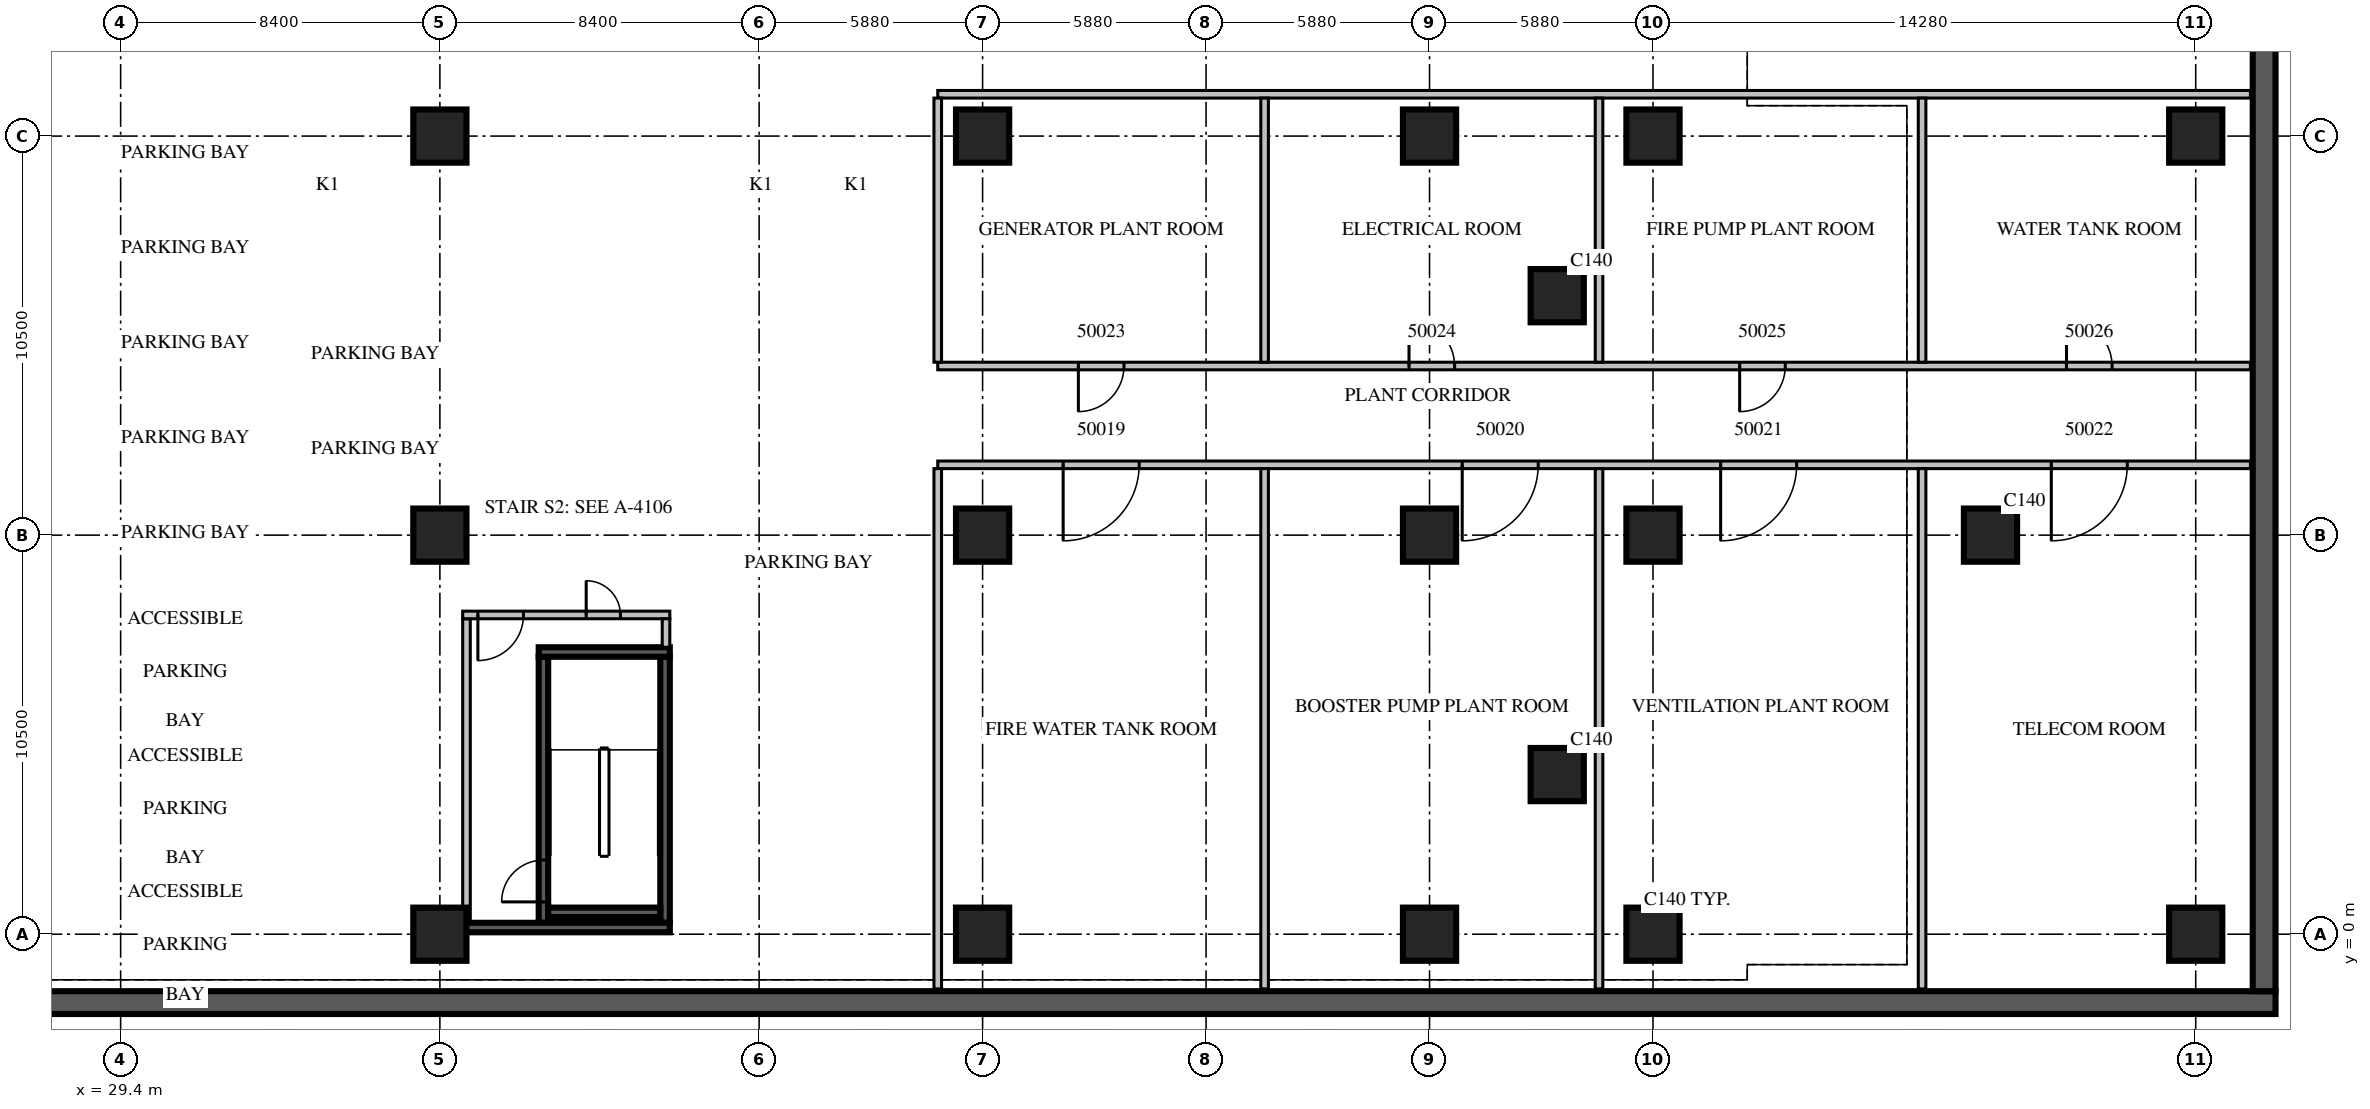
"""IFC4 building model, lengths in metres.
Left out: names, types, materials, properties, quantities, classifications, styles, units other than length and angle.
Written with IfcOpenShell. Run it as: python <this file> out.ifc"""

import sys

from ifc_helpers import new_model, si_unit, direction, frame, frame_2d, origin, origin_2d, place, context, subcontext, project, spatial, rectangle, extrude, source, transform, mapped, element, fill, save


model = new_model("IFC4")
c1 = context("Model", 3, precision=1e-05, world=origin(), true_north=direction((0.0, 1.0)))
c2 = subcontext(c1, "Body", "Model", "MODEL_VIEW")
j1 = project(units=[si_unit("LENGTHUNIT", "METRE"), si_unit("PLANEANGLEUNIT", "RADIAN")], contexts=[c1])
p1 = place(None, origin())
s1 = spatial("IfcSite", under=j1, at=p1, CompositionType="ELEMENT")
p2 = place(p1, origin())
s2 = spatial("IfcBuilding", under=s1, at=p2, CompositionType="ELEMENT")
p3 = place(p2, frame((0.0, 0.0, -13.5)))
s3 = spatial("IfcBuildingStorey", under=s2, at=p3, CompositionType="ELEMENT", Elevation=-13.5)
m1 = source(origin(), c2, "Body", "SweptSolid", [
    extrude(rectangle(XDim=87.6, YDim=0.6, at=frame_2d((43.8, 0.0))), origin(), (0.0, 0.0, 1.0), 4.5),
])
p4 = place(p3, frame((-1.5, -1.8, 0.0), z_axis=(0.0, 0.0, 1.0), x_axis=(1.0, 0.0, 0.0)))
e1 = element("IfcWall", 1, at=p4, inside=s3, PredefinedType="SOLIDWALL", context=c2, shape_type="MappedRepresentation", body=[
    mapped(m1, transform((0.0, 0.0, 0.0), scale=1.0)),
])
m2 = source(origin(), c2, "Body", "SweptSolid", [
    extrude(rectangle(XDim=55.68, YDim=0.6, at=frame_2d((27.84, 0.0))), origin(), (0.0, 0.0, 1.0), 4.5),
])
p5 = place(p3, frame((85.8, -1.5, 0.0), z_axis=(0.0, 0.0, 1.0), x_axis=(0.0, 1.0, 0.0)))
e2 = element("IfcWall", 2, at=p5, inside=s3, PredefinedType="SOLIDWALL", context=c2, shape_type="MappedRepresentation", body=[
    mapped(m2, transform((0.0, 0.0, 0.0), scale=1.0)),
])
m3 = source(origin(), c2, "Body", "SweptSolid", [
    extrude(rectangle(XDim=1.4, YDim=1.4, at=origin_2d()), origin(), (0.0, 0.0, 1.0), 4.5),
])
for number, where, z_axis, x_axis in (
    (3, (37.8, 0.0, 0.0), (0.0, 0.0, 1.0), (1.0, 0.0, 0.0)),
    (4, (37.8, 10.5, 0.0), (0.0, 0.0, 1.0), (1.0, 0.0, 0.0)),
    (5, (37.8, 21.0, 0.0), (0.0, 0.0, 1.0), (1.0, 0.0, 0.0)),
    (6, (52.08, 0.0, 0.0), (0.0, 0.0, 1.0), (1.0, 0.0, 0.0)),
    (7, (52.08, 10.5, 0.0), (0.0, 0.0, 1.0), (1.0, 0.0, 0.0)),
    (8, (52.08, 21.0, 0.0), (0.0, 0.0, 1.0), (1.0, 0.0, 0.0)),
    (9, (63.84, 0.0, 0.0), (0.0, 0.0, 1.0), (1.0, 0.0, 0.0)),
    (10, (63.84, 10.5, 0.0), (0.0, 0.0, 1.0), (1.0, 0.0, 0.0)),
    (11, (63.84, 21.0, 0.0), (0.0, 0.0, 1.0), (1.0, 0.0, 0.0)),
    (12, (67.2, 4.2, 0.0), (0.0, 0.0, 1.0), (1.0, 0.0, 0.0)),
    (13, (67.2, 16.8, 0.0), (0.0, 0.0, 1.0), (1.0, 0.0, 0.0)),
    (14, (69.72, 0.0, 0.0), (0.0, 0.0, 1.0), (1.0, 0.0, 0.0)),
    (15, (69.72, 10.5, 0.0), (0.0, 0.0, 1.0), (1.0, 0.0, 0.0)),
    (16, (69.72, 21.0, 0.0), (0.0, 0.0, 1.0), (1.0, 0.0, 0.0)),
    (17, (78.6, 10.5, 0.0), (0.0, 0.0, 1.0), (1.0, 0.0, 0.0)),
    (18, (84.0, 0.0, 0.0), (0.0, 0.0, 1.0), (1.0, 0.0, 0.0)),
    (19, (84.0, 21.0, 0.0), (0.0, 0.0, 1.0), (1.0, 0.0, 0.0)),
):
    element("IfcColumn", number, at=place(p3, frame(where, z_axis=z_axis, x_axis=x_axis)), inside=s3, PredefinedType="COLUMN", context=c2, shape_type="MappedRepresentation", body=[
        mapped(m3, transform((0.0, 0.0, 0.0), scale=1.0)),
    ])
p6 = place(p3, frame((40.525, 0.3, 0.0), z_axis=(0.0, 0.0, 1.0), x_axis=(0.0, 1.0, 0.0)))
e20 = element("IfcWall", 20, at=p6, inside=s3, PredefinedType="SOLIDWALL", context=c2, shape_type="SweptSolid", body=[
    extrude(rectangle(XDim=7.0, YDim=0.25, at=frame_2d((3.5, 0.0))), origin(), (0.0, 0.0, 1.0), 3.9),
])
m4 = source(origin(), c2, "Body", "SweptSolid", [
    extrude(rectangle(XDim=1.1, YDim=2.1, at=frame_2d((0.55, 1.05))), frame((0.0, 0.135, 0.0), z_axis=(0.0, -1.0, 0.0), x_axis=(1.0, 0.0, 0.0)), (0.0, 0.0, 1.0), 0.27),
])
p7 = place(p6, frame((0.55, 0.0, 0.0)))
e21 = element("IfcOpeningElement", 21, at=p7, cuts=e20, PredefinedType="OPENING", context=c2, shape_type="MappedRepresentation", body=[
    mapped(m4, transform((0.0, 0.0, 0.0), scale=1.0)),
])
m5 = source(origin(), c2, "Body", "SweptSolid", [
    extrude(rectangle(XDim=7.0, YDim=0.25, at=frame_2d((3.5, 0.0))), origin(), (0.0, 0.0, 1.0), 3.9),
])
p8 = place(p3, frame((43.725, 0.3, 0.0), z_axis=(0.0, 0.0, 1.0), x_axis=(0.0, 1.0, 0.0)))
e22 = element("IfcWall", 22, at=p8, inside=s3, PredefinedType="SOLIDWALL", context=c2, shape_type="MappedRepresentation", body=[
    mapped(m5, transform((0.0, 0.0, 0.0), scale=1.0)),
])
p9 = place(p3, frame((40.4, 7.425, 0.0), z_axis=(0.0, 0.0, 1.0), x_axis=(1.0, 0.0, 0.0)))
e23 = element("IfcWall", 23, at=p9, inside=s3, PredefinedType="SOLIDWALL", context=c2, shape_type="SweptSolid", body=[
    extrude(rectangle(XDim=3.45, YDim=0.25, at=frame_2d((1.725, 0.0))), origin(), (0.0, 0.0, 1.0), 3.9),
])
p10 = place(p3, frame((40.65, 0.575, 0.0), z_axis=(0.0, 0.0, 1.0), x_axis=(1.0, 0.0, 0.0)))
e24 = element("IfcWall", 24, at=p10, inside=s3, PredefinedType="SOLIDWALL", context=c2, shape_type="SweptSolid", body=[
    extrude(rectangle(XDim=2.95, YDim=0.25, at=frame_2d((1.475, 0.0))), origin(), (0.0, 0.0, 1.0), 3.9),
])
p11 = place(p3, frame((38.5, 0.3, 0.0), z_axis=(0.0, 0.0, 1.0), x_axis=(0.0, 1.0, 0.0)))
e25 = element("IfcWall", 25, at=p11, inside=s3, PredefinedType="PARTITIONING", context=c2, shape_type="SweptSolid", body=[
    extrude(rectangle(XDim=8.0, YDim=0.2, at=frame_2d((4.0, 0.0))), origin(), (0.0, 0.0, 1.0), 3.9),
])
p12 = place(p3, frame((38.4, 8.4, 0.0), z_axis=(0.0, 0.0, 1.0), x_axis=(1.0, 0.0, 0.0)))
e26 = element("IfcWall", 26, at=p12, inside=s3, PredefinedType="PARTITIONING", context=c2, shape_type="SweptSolid", body=[
    extrude(rectangle(XDim=5.45, YDim=0.2, at=frame_2d((2.725, 0.0))), origin(), (0.0, 0.0, 1.0), 3.9),
])
p13 = place(p12, frame((0.4, 0.0, 0.0)))
e27 = element("IfcOpeningElement", 27, at=p13, cuts=e26, PredefinedType="OPENING", context=c2, shape_type="SweptSolid", body=[
    extrude(rectangle(XDim=1.2, YDim=2.1, at=frame_2d((0.6, 1.05))), frame((0.0, 0.11, 0.0), z_axis=(0.0, -1.0, 0.0), x_axis=(1.0, 0.0, 0.0)), (0.0, 0.0, 1.0), 0.22),
])
m6 = source(origin(), c2, "Body", "SweptSolid", [
    extrude(rectangle(XDim=0.9, YDim=2.1, at=frame_2d((0.45, 1.05))), frame((0.0, 0.11, 0.0), z_axis=(0.0, -1.0, 0.0), x_axis=(1.0, 0.0, 0.0)), (0.0, 0.0, 1.0), 0.22),
])
p14 = place(p12, frame((3.25, 0.0, 0.0)))
e28 = element("IfcOpeningElement", 28, at=p14, cuts=e26, PredefinedType="OPENING", context=c2, shape_type="MappedRepresentation", body=[
    mapped(m6, transform((0.0, 0.0, 0.0), scale=1.0)),
])
p15 = place(p3, frame((43.75, 7.55, 0.0), z_axis=(0.0, 0.0, 1.0), x_axis=(0.0, 1.0, 0.0)))
e29 = element("IfcWall", 29, at=p15, inside=s3, PredefinedType="PARTITIONING", context=c2, shape_type="SweptSolid", body=[
    extrude(rectangle(XDim=0.75, YDim=0.2, at=frame_2d((0.375, 0.0))), origin(), (0.0, 0.0, 1.0), 3.9),
])
p16 = place(p3, frame((38.4, 0.175, 0.0), z_axis=(0.0, 0.0, 1.0), x_axis=(1.0, 0.0, 0.0)))
e30 = element("IfcWall", 30, at=p16, inside=s3, PredefinedType="SOLIDWALL", context=c2, shape_type="SweptSolid", body=[
    extrude(rectangle(XDim=5.45, YDim=0.25, at=frame_2d((2.725, 0.0))), origin(), (0.0, 0.0, 1.0), 3.9),
])
p17 = place(p3, frame((50.9, 12.35, 0.0), z_axis=(0.0, 0.0, 1.0), x_axis=(1.0, 0.0, 0.0)))
e31 = element("IfcWall", 31, at=p17, inside=s3, PredefinedType="PARTITIONING", context=c2, shape_type="SweptSolid", body=[
    extrude(rectangle(XDim=34.54, YDim=0.2, at=frame_2d((17.27, 0.0))), origin(), (0.0, 0.0, 1.0), 3.9),
])
m7 = source(origin(), c2, "Body", "SweptSolid", [
    extrude(rectangle(XDim=2.0, YDim=2.1, at=frame_2d((1.0, 1.05))), frame((0.0, 0.11, 0.0), z_axis=(0.0, -1.0, 0.0), x_axis=(1.0, 0.0, 0.0)), (0.0, 0.0, 1.0), 0.22),
])
p18 = place(p17, frame((3.3, 0.0, 0.0)))
e32 = element("IfcOpeningElement", 32, at=p18, cuts=e31, PredefinedType="OPENING", context=c2, shape_type="MappedRepresentation", body=[
    mapped(m7, transform((0.0, 0.0, 0.0), scale=1.0)),
])
p19 = place(p17, frame((13.8, 0.0, 0.0)))
e33 = element("IfcOpeningElement", 33, at=p19, cuts=e31, PredefinedType="OPENING", context=c2, shape_type="MappedRepresentation", body=[
    mapped(m7, transform((0.0, 0.0, 0.0), scale=1.0)),
])
p20 = place(p17, frame((20.6, 0.0, 0.0)))
e34 = element("IfcOpeningElement", 34, at=p20, cuts=e31, PredefinedType="OPENING", context=c2, shape_type="MappedRepresentation", body=[
    mapped(m7, transform((0.0, 0.0, 0.0), scale=1.0)),
])
p21 = place(p17, frame((29.3, 0.0, 0.0)))
e35 = element("IfcOpeningElement", 35, at=p21, cuts=e31, PredefinedType="OPENING", context=c2, shape_type="MappedRepresentation", body=[
    mapped(m7, transform((0.0, 0.0, 0.0), scale=1.0)),
])
m8 = source(origin(), c2, "Body", "SweptSolid", [
    extrude(rectangle(XDim=34.54, YDim=0.2, at=frame_2d((17.27, 0.0))), origin(), (0.0, 0.0, 1.0), 3.9),
])
p22 = place(p3, frame((50.9, 14.95, 0.0), z_axis=(0.0, 0.0, 1.0), x_axis=(1.0, 0.0, 0.0)))
e36 = element("IfcWall", 36, at=p22, inside=s3, PredefinedType="PARTITIONING", context=c2, shape_type="MappedRepresentation", body=[
    mapped(m8, transform((0.0, 0.0, 0.0), scale=1.0)),
])
m9 = source(origin(), c2, "Body", "SweptSolid", [
    extrude(rectangle(XDim=1.2, YDim=2.1, at=frame_2d((0.6, 1.05))), frame((0.0, 0.11, 0.0), z_axis=(0.0, -1.0, 0.0), x_axis=(1.0, 0.0, 0.0)), (0.0, 0.0, 1.0), 0.22),
])
p23 = place(p22, frame((3.7, 0.0, 0.0)))
e37 = element("IfcOpeningElement", 37, at=p23, cuts=e36, PredefinedType="OPENING", context=c2, shape_type="MappedRepresentation", body=[
    mapped(m9, transform((0.0, 0.0, 0.0), scale=1.0)),
])
p24 = place(p22, frame((12.4, 0.0, 0.0)))
e38 = element("IfcOpeningElement", 38, at=p24, cuts=e36, PredefinedType="OPENING", context=c2, shape_type="MappedRepresentation", body=[
    mapped(m9, transform((0.0, 0.0, 0.0), scale=1.0)),
])
p25 = place(p22, frame((21.1, 0.0, 0.0)))
e39 = element("IfcOpeningElement", 39, at=p25, cuts=e36, PredefinedType="OPENING", context=c2, shape_type="MappedRepresentation", body=[
    mapped(m9, transform((0.0, 0.0, 0.0), scale=1.0)),
])
p26 = place(p22, frame((29.7, 0.0, 0.0)))
e40 = element("IfcOpeningElement", 40, at=p26, cuts=e36, PredefinedType="OPENING", context=c2, shape_type="MappedRepresentation", body=[
    mapped(m9, transform((0.0, 0.0, 0.0), scale=1.0)),
])
p27 = place(p3, frame((50.9, 22.1, 0.0), z_axis=(0.0, 0.0, 1.0), x_axis=(1.0, 0.0, 0.0)))
e41 = element("IfcWall", 41, at=p27, inside=s3, PredefinedType="PARTITIONING", context=c2, shape_type="MappedRepresentation", body=[
    mapped(m8, transform((0.0, 0.0, 0.0), scale=1.0)),
])
p28 = place(p3, frame((50.9, -1.44, 0.0), z_axis=(0.0, 0.0, 1.0), x_axis=(0.0, 1.0, 0.0)))
e42 = element("IfcWall", 42, at=p28, inside=s3, PredefinedType="PARTITIONING", context=c2, shape_type="SweptSolid", body=[
    extrude(rectangle(XDim=13.69, YDim=0.2, at=frame_2d((6.845, 0.0))), origin(), (0.0, 0.0, 1.0), 3.9),
])
p29 = place(p3, frame((50.9, 15.05, 0.0), z_axis=(0.0, 0.0, 1.0), x_axis=(0.0, 1.0, 0.0)))
e43 = element("IfcWall", 43, at=p29, inside=s3, PredefinedType="PARTITIONING", context=c2, shape_type="SweptSolid", body=[
    extrude(rectangle(XDim=6.95, YDim=0.2, at=frame_2d((3.475, 0.0))), origin(), (0.0, 0.0, 1.0), 3.9),
])
m10 = source(origin(), c2, "Body", "SweptSolid", [
    extrude(rectangle(XDim=13.69, YDim=0.2, at=frame_2d((6.845, 0.0))), origin(), (0.0, 0.0, 1.0), 3.9),
])
p30 = place(p3, frame((59.5, -1.44, 0.0), z_axis=(0.0, 0.0, 1.0), x_axis=(0.0, 1.0, 0.0)))
e44 = element("IfcWall", 44, at=p30, inside=s3, PredefinedType="PARTITIONING", context=c2, shape_type="MappedRepresentation", body=[
    mapped(m10, transform((0.0, 0.0, 0.0), scale=1.0)),
])
m11 = source(origin(), c2, "Body", "SweptSolid", [
    extrude(rectangle(XDim=6.95, YDim=0.2, at=frame_2d((3.475, 0.0))), origin(), (0.0, 0.0, 1.0), 3.9),
])
p31 = place(p3, frame((59.5, 15.05, 0.0), z_axis=(0.0, 0.0, 1.0), x_axis=(0.0, 1.0, 0.0)))
e45 = element("IfcWall", 45, at=p31, inside=s3, PredefinedType="PARTITIONING", context=c2, shape_type="MappedRepresentation", body=[
    mapped(m11, transform((0.0, 0.0, 0.0), scale=1.0)),
])
p32 = place(p3, frame((68.3, -1.44, 0.0), z_axis=(0.0, 0.0, 1.0), x_axis=(0.0, 1.0, 0.0)))
e46 = element("IfcWall", 46, at=p32, inside=s3, PredefinedType="PARTITIONING", context=c2, shape_type="MappedRepresentation", body=[
    mapped(m10, transform((0.0, 0.0, 0.0), scale=1.0)),
])
p33 = place(p3, frame((68.3, 15.05, 0.0), z_axis=(0.0, 0.0, 1.0), x_axis=(0.0, 1.0, 0.0)))
e47 = element("IfcWall", 47, at=p33, inside=s3, PredefinedType="PARTITIONING", context=c2, shape_type="MappedRepresentation", body=[
    mapped(m11, transform((0.0, 0.0, 0.0), scale=1.0)),
])
p34 = place(p3, frame((76.8, -1.44, 0.0), z_axis=(0.0, 0.0, 1.0), x_axis=(0.0, 1.0, 0.0)))
e48 = element("IfcWall", 48, at=p34, inside=s3, PredefinedType="PARTITIONING", context=c2, shape_type="MappedRepresentation", body=[
    mapped(m10, transform((0.0, 0.0, 0.0), scale=1.0)),
])
p35 = place(p3, frame((76.8, 15.05, 0.0), z_axis=(0.0, 0.0, 1.0), x_axis=(0.0, 1.0, 0.0)))
e49 = element("IfcWall", 49, at=p35, inside=s3, PredefinedType="PARTITIONING", context=c2, shape_type="MappedRepresentation", body=[
    mapped(m11, transform((0.0, 0.0, 0.0), scale=1.0)),
])
m12 = source(origin(), c2, "Body", "SweptSolid", [
    extrude(rectangle(XDim=1.1, YDim=2.1, at=frame_2d((0.55, 1.05))), frame((0.0, 0.025, 0.0), z_axis=(0.0, -1.0, 0.0), x_axis=(1.0, 0.0, 0.0)), (0.0, 0.0, 1.0), 0.05),
])
p36 = place(p7, origin())
e50 = element("IfcDoor", 50, at=p36, inside=s3, OperationType="SINGLE_SWING_LEFT", PredefinedType="DOOR", context=c2, shape_type="MappedRepresentation", body=[
    mapped(m12, transform((0.0, 0.0, 0.0), scale=1.0)),
])
fill(e21, e50)
p37 = place(p13, origin())
e51 = element("IfcDoor", 51, at=p37, inside=s3, OperationType="SINGLE_SWING_RIGHT", PredefinedType="DOOR", context=c2, shape_type="SweptSolid", body=[
    extrude(rectangle(XDim=1.2, YDim=2.1, at=frame_2d((0.6, 1.05))), frame((0.0, 0.025, 0.0), z_axis=(0.0, -1.0, 0.0), x_axis=(1.0, 0.0, 0.0)), (0.0, 0.0, 1.0), 0.05),
])
fill(e27, e51)
m13 = source(origin(), c2, "Body", "SweptSolid", [
    extrude(rectangle(XDim=0.9, YDim=2.1, at=frame_2d((0.45, 1.05))), frame((0.0, 0.025, 0.0), z_axis=(0.0, -1.0, 0.0), x_axis=(1.0, 0.0, 0.0)), (0.0, 0.0, 1.0), 0.05),
])
p38 = place(p14, origin())
e52 = element("IfcDoor", 52, at=p38, inside=s3, OperationType="SINGLE_SWING_LEFT", PredefinedType="DOOR", context=c2, shape_type="MappedRepresentation", body=[
    mapped(m13, transform((0.0, 0.0, 0.0), scale=1.0)),
])
fill(e28, e52)
m14 = source(origin(), c2, "Body", "SweptSolid", [
    extrude(rectangle(XDim=2.0, YDim=2.1, at=frame_2d((1.0, 1.05))), frame((0.0, 0.025, 0.0), z_axis=(0.0, -1.0, 0.0), x_axis=(1.0, 0.0, 0.0)), (0.0, 0.0, 1.0), 0.05),
])
p39 = place(p18, origin())
e53 = element("IfcDoor", 53, at=p39, inside=s3, OperationType="DOUBLE_DOOR_SINGLE_SWING", PredefinedType="DOOR", context=c2, shape_type="MappedRepresentation", body=[
    mapped(m14, transform((0.0, 0.0, 0.0), scale=1.0)),
])
fill(e32, e53)
p40 = place(p19, origin())
e54 = element("IfcDoor", 54, at=p40, inside=s3, OperationType="DOUBLE_DOOR_SINGLE_SWING", PredefinedType="DOOR", context=c2, shape_type="MappedRepresentation", body=[
    mapped(m14, transform((0.0, 0.0, 0.0), scale=1.0)),
])
fill(e33, e54)
p41 = place(p20, origin())
e55 = element("IfcDoor", 55, at=p41, inside=s3, OperationType="DOUBLE_DOOR_SINGLE_SWING", PredefinedType="DOOR", context=c2, shape_type="MappedRepresentation", body=[
    mapped(m14, transform((0.0, 0.0, 0.0), scale=1.0)),
])
fill(e34, e55)
p42 = place(p21, origin())
e56 = element("IfcDoor", 56, at=p42, inside=s3, OperationType="DOUBLE_DOOR_SINGLE_SWING", PredefinedType="DOOR", context=c2, shape_type="MappedRepresentation", body=[
    mapped(m14, transform((0.0, 0.0, 0.0), scale=1.0)),
])
fill(e35, e56)
m15 = source(origin(), c2, "Body", "SweptSolid", [
    extrude(rectangle(XDim=1.2, YDim=2.1, at=frame_2d((0.6, 1.05))), frame((0.0, 0.025, 0.0), z_axis=(0.0, -1.0, 0.0), x_axis=(1.0, 0.0, 0.0)), (0.0, 0.0, 1.0), 0.05),
])
p43 = place(p23, origin())
e57 = element("IfcDoor", 57, at=p43, inside=s3, OperationType="SINGLE_SWING_RIGHT", PredefinedType="DOOR", context=c2, shape_type="MappedRepresentation", body=[
    mapped(m15, transform((0.0, 0.0, 0.0), scale=1.0)),
])
fill(e37, e57)
p44 = place(p24, origin())
e58 = element("IfcDoor", 58, at=p44, inside=s3, OperationType="SINGLE_SWING_LEFT", PredefinedType="DOOR", context=c2, shape_type="MappedRepresentation", body=[
    mapped(m15, transform((0.0, 0.0, 0.0), scale=1.0)),
])
fill(e38, e58)
p45 = place(p25, origin())
e59 = element("IfcDoor", 59, at=p45, inside=s3, OperationType="SINGLE_SWING_RIGHT", PredefinedType="DOOR", context=c2, shape_type="MappedRepresentation", body=[
    mapped(m15, transform((0.0, 0.0, 0.0), scale=1.0)),
])
fill(e39, e59)
p46 = place(p26, origin())
e60 = element("IfcDoor", 60, at=p46, inside=s3, OperationType="SINGLE_SWING_LEFT", PredefinedType="DOOR", context=c2, shape_type="MappedRepresentation", body=[
    mapped(m15, transform((0.0, 0.0, 0.0), scale=1.0)),
])
fill(e40, e60)
save(model, sys.argv[1])
